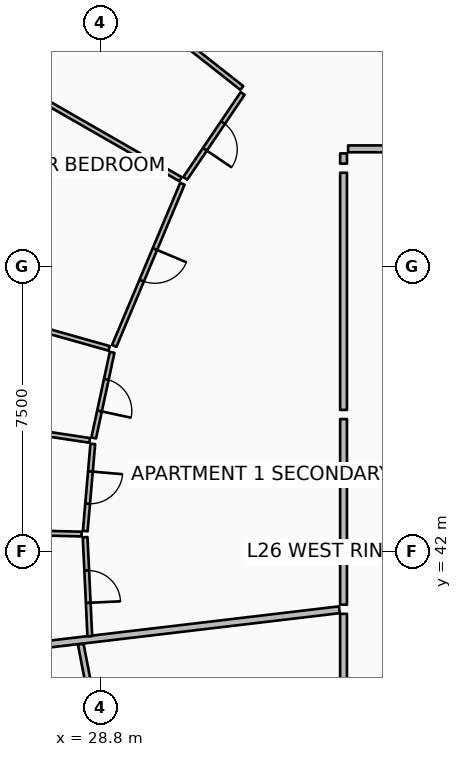
"""IFC4 building model, lengths in metres.
Left out: names, types, materials, properties, quantities, classifications, styles, units other than length and angle.
Written with IfcOpenShell. Run it as: python <this file> out.ifc"""

import sys

from ifc_helpers import new_model, si_unit, direction, frame, frame_2d, origin, place, context, subcontext, project, spatial, rectangle, extrude, element, fill, save


model = new_model("IFC4")
c1 = context("Model", 3, precision=1e-05, world=origin(), true_north=direction((0.0, 1.0)))
c2 = subcontext(c1, "Body", "Model", "MODEL_VIEW")
j1 = project(units=[si_unit("LENGTHUNIT", "METRE"), si_unit("PLANEANGLEUNIT", "RADIAN")], contexts=[c1])
p1 = place(None, origin())
s1 = spatial("IfcSite", under=j1, at=p1, CompositionType="ELEMENT")
p2 = place(p1, origin())
s2 = spatial("IfcBuilding", under=s1, at=p2, CompositionType="ELEMENT")
p3 = place(p2, frame((0.0, 0.0, 105.15)))
s3 = spatial("IfcBuildingStorey", under=s2, at=p3, CompositionType="ELEMENT", Elevation=105.15)
p4 = place(p3, frame((35.091, 40.472, 0.0), z_axis=(0.0, 0.0, 1.0), x_axis=(-0.99306845132, -0.117537445069, 0.0)))
e1 = element("IfcWall", 1, at=p4, inside=s3, PredefinedType="PARTITIONING", context=c2, shape_type="SweptSolid", body=[
    extrude(rectangle(XDim=16.48, YDim=0.18, at=frame_2d((8.24, 0.0))), origin(), (0.0, 0.0, 1.0), 2.94),
])
p5 = place(p3, frame((41.944, 52.6, 0.0), z_axis=(0.0, 0.0, 1.0), x_axis=(-1.0, 0.0, 0.0)))
e2 = element("IfcWall", 2, at=p5, inside=s3, PredefinedType="PARTITIONING", context=c2, shape_type="SweptSolid", body=[
    extrude(rectangle(XDim=6.624, YDim=0.18, at=frame_2d((3.312, 0.0))), origin(), (0.0, 0.0, 1.0), 2.94),
])
p6 = place(p5, frame((2.762, 0.0, 0.0)))
e3 = element("IfcOpeningElement", 3, at=p6, cuts=e2, PredefinedType="OPENING", context=c2, shape_type="SweptSolid", body=[
    extrude(rectangle(XDim=1.1, YDim=2.1, at=frame_2d((0.55, 1.05))), frame((0.0, 0.1, 0.0), z_axis=(0.0, -1.0, 0.0), x_axis=(1.0, 0.0, 0.0)), (0.0, 0.0, 1.0), 0.2),
])
p7 = place(p3, frame((35.2, 52.48, 0.0), z_axis=(0.0, 0.0, 1.0), x_axis=(0.0, -1.0, 0.0)))
e4 = element("IfcWall", 4, at=p7, inside=s3, PredefinedType="PARTITIONING", context=c2, shape_type="SweptSolid", body=[
    extrude(rectangle(XDim=0.269, YDim=0.18, at=frame_2d((0.135, 0.0))), origin(), (0.0, 0.0, 1.0), 2.94),
])
p8 = place(p3, frame((35.2, 51.971, 0.0), z_axis=(0.0, 0.0, 1.0), x_axis=(0.0, -1.0, 0.0)))
e5 = element("IfcWall", 5, at=p8, inside=s3, PredefinedType="PARTITIONING", context=c2, shape_type="SweptSolid", body=[
    extrude(rectangle(XDim=6.241, YDim=0.18, at=frame_2d((3.12, 0.0))), origin(), (0.0, 0.0, 1.0), 2.94),
])
p9 = place(p3, frame((32.522, 54.202, 0.0), z_axis=(0.0, 0.0, 1.0), x_axis=(-0.785296086335, 0.619120389574, 0.0)))
e6 = element("IfcWall", 6, at=p9, inside=s3, PredefinedType="PARTITIONING", context=c2, shape_type="SweptSolid", body=[
    extrude(rectangle(XDim=6.529, YDim=0.125, at=frame_2d((3.265, 0.0))), origin(), (0.0, 0.0, 1.0), 2.94),
])
p10 = place(p3, frame((30.912, 51.8, 0.0), z_axis=(0.0, 0.0, 1.0), x_axis=(-0.867452705788, 0.497519651091, 0.0)))
e7 = element("IfcWall", 7, at=p10, inside=s3, PredefinedType="PARTITIONING", context=c2, shape_type="SweptSolid", body=[
    extrude(rectangle(XDim=6.814, YDim=0.125, at=frame_2d((3.407, 0.0))), origin(), (0.0, 0.0, 1.0), 2.94),
])
p11 = place(p3, frame((32.545, 54.057, 0.0), z_axis=(0.0, 0.0, 1.0), x_axis=(-0.559849013212, -0.828594642998, 0.0)))
e8 = element("IfcWall", 8, at=p11, inside=s3, PredefinedType="PARTITIONING", context=c2, shape_type="SweptSolid", body=[
    extrude(rectangle(XDim=2.697, YDim=0.125, at=frame_2d((1.349, 0.0))), origin(), (0.0, 0.0, 1.0), 2.94),
])
p12 = place(p11, frame((0.924, 0.0, 0.0)))
e9 = element("IfcOpeningElement", 9, at=p12, cuts=e8, PredefinedType="OPENING", context=c2, shape_type="SweptSolid", body=[
    extrude(rectangle(XDim=0.85, YDim=2.06, at=frame_2d((0.425, 1.03))), frame((0.0, 0.073, 0.0), z_axis=(0.0, -1.0, 0.0), x_axis=(1.0, 0.0, 0.0)), (0.0, 0.0, 1.0), 0.145),
])
p13 = place(p3, frame((30.959, 51.682, 0.0), z_axis=(0.0, 0.0, 1.0), x_axis=(-0.387377754923, -0.921921078505, 0.0)))
e10 = element("IfcWall", 10, at=p13, inside=s3, PredefinedType="PARTITIONING", context=c2, shape_type="SweptSolid", body=[
    extrude(rectangle(XDim=4.628, YDim=0.125, at=frame_2d((2.314, 0.0))), origin(), (0.0, 0.0, 1.0), 2.94),
])
p14 = place(p13, frame((1.864, 0.0, 0.0)))
e11 = element("IfcOpeningElement", 11, at=p14, cuts=e10, PredefinedType="OPENING", context=c2, shape_type="SweptSolid", body=[
    extrude(rectangle(XDim=0.9, YDim=2.08, at=frame_2d((0.45, 1.04))), frame((0.0, 0.073, 0.0), z_axis=(0.0, -1.0, 0.0), x_axis=(1.0, 0.0, 0.0)), (0.0, 0.0, 1.0), 0.145),
])
p15 = place(p3, frame((35.2, 45.49, 0.0), z_axis=(0.0, 0.0, 1.0), x_axis=(0.0, -1.0, 0.0)))
e12 = element("IfcWall", 12, at=p15, inside=s3, PredefinedType="PARTITIONING", context=c2, shape_type="SweptSolid", body=[
    extrude(rectangle(XDim=4.885, YDim=0.18, at=frame_2d((2.442, 0.0))), origin(), (0.0, 0.0, 1.0), 2.94),
])
p16 = place(p3, frame((29.031, 47.35, 0.0), z_axis=(0.0, 0.0, 1.0), x_axis=(-0.962455027906, 0.271441189317, 0.0)))
e13 = element("IfcWall", 13, at=p16, inside=s3, PredefinedType="PARTITIONING", context=c2, shape_type="SweptSolid", body=[
    extrude(rectangle(XDim=8.862, YDim=0.125, at=frame_2d((4.431, 0.0))), origin(), (0.0, 0.0, 1.0), 2.94),
])
p17 = place(p3, frame((28.52, 44.929, 0.0), z_axis=(0.0, 0.0, 1.0), x_axis=(-0.988886383278, 0.148673201912, 0.0)))
e14 = element("IfcWall", 14, at=p17, inside=s3, PredefinedType="PARTITIONING", context=c2, shape_type="SweptSolid", body=[
    extrude(rectangle(XDim=8.969, YDim=0.125, at=frame_2d((4.485, 0.0))), origin(), (0.0, 0.0, 1.0), 2.94),
])
p18 = place(p3, frame((28.306, 42.464, 0.0), z_axis=(0.0, 0.0, 1.0), x_axis=(-0.999722179252, 0.023570411771, 0.0)))
e15 = element("IfcWall", 15, at=p18, inside=s3, PredefinedType="PARTITIONING", context=c2, shape_type="SweptSolid", body=[
    extrude(rectangle(XDim=9.426, YDim=0.125, at=frame_2d((4.713, 0.0))), origin(), (0.0, 0.0, 1.0), 2.94),
])
p19 = place(p3, frame((29.11, 47.244, 0.0), z_axis=(0.0, 0.0, 1.0), x_axis=(-0.210470334655, -0.977600244594, 0.0)))
e16 = element("IfcWall", 16, at=p19, inside=s3, PredefinedType="PARTITIONING", context=c2, shape_type="SweptSolid", body=[
    extrude(rectangle(XDim=2.302, YDim=0.125, at=frame_2d((1.151, 0.0))), origin(), (0.0, 0.0, 1.0), 2.94),
])
p20 = place(p19, frame((0.726, 0.0, 0.0)))
e17 = element("IfcOpeningElement", 17, at=p20, cuts=e16, PredefinedType="OPENING", context=c2, shape_type="SweptSolid", body=[
    extrude(rectangle(XDim=0.85, YDim=2.06, at=frame_2d((0.425, 1.03))), frame((0.0, 0.073, 0.0), z_axis=(0.0, -1.0, 0.0), x_axis=(1.0, 0.0, 0.0)), (0.0, 0.0, 1.0), 0.145),
])
p21 = place(p3, frame((28.602, 44.836, 0.0), z_axis=(0.0, 0.0, 1.0), x_axis=(-0.086309330274, -0.996268387287, 0.0)))
e18 = element("IfcWall", 18, at=p21, inside=s3, PredefinedType="PARTITIONING", context=c2, shape_type="SweptSolid", body=[
    extrude(rectangle(XDim=2.302, YDim=0.125, at=frame_2d((1.151, 0.0))), origin(), (0.0, 0.0, 1.0), 2.94),
])
p22 = place(p21, frame((0.726, 0.0, 0.0)))
e19 = element("IfcOpeningElement", 19, at=p22, cuts=e18, PredefinedType="OPENING", context=c2, shape_type="SweptSolid", body=[
    extrude(rectangle(XDim=0.85, YDim=2.06, at=frame_2d((0.425, 1.03))), frame((0.0, 0.073, 0.0), z_axis=(0.0, -1.0, 0.0), x_axis=(1.0, 0.0, 0.0)), (0.0, 0.0, 1.0), 0.145),
])
p23 = place(p3, frame((28.4, 42.382, 0.0), z_axis=(0.0, 0.0, 1.0), x_axis=(0.047147361322, -0.998887944827, 0.0)))
e20 = element("IfcWall", 20, at=p23, inside=s3, PredefinedType="PARTITIONING", context=c2, shape_type="SweptSolid", body=[
    extrude(rectangle(XDim=2.61, YDim=0.125, at=frame_2d((1.305, 0.0))), origin(), (0.0, 0.0, 1.0), 2.94),
])
p24 = place(p23, frame((0.88, 0.0, 0.0)))
e21 = element("IfcOpeningElement", 21, at=p24, cuts=e20, PredefinedType="OPENING", context=c2, shape_type="SweptSolid", body=[
    extrude(rectangle(XDim=0.85, YDim=2.06, at=frame_2d((0.425, 1.03))), frame((0.0, 0.073, 0.0), z_axis=(0.0, -1.0, 0.0), x_axis=(1.0, 0.0, 0.0)), (0.0, 0.0, 1.0), 0.145),
])
p25 = place(p3, frame((35.2, 40.365, 0.0), z_axis=(0.0, 0.0, 1.0), x_axis=(0.0, -1.0, 0.0)))
e22 = element("IfcWall", 22, at=p25, inside=s3, PredefinedType="PARTITIONING", context=c2, shape_type="SweptSolid", body=[
    extrude(rectangle(XDim=5.413, YDim=0.18, at=frame_2d((2.707, 0.0))), origin(), (0.0, 0.0, 1.0), 2.94),
])
p26 = place(p3, frame((28.285, 39.566, 0.0), z_axis=(0.0, 0.0, 1.0), x_axis=(0.189069796262, -0.98196365113, 0.0)))
e23 = element("IfcWall", 23, at=p26, inside=s3, PredefinedType="PARTITIONING", context=c2, shape_type="SweptSolid", body=[
    extrude(rectangle(XDim=2.687, YDim=0.15, at=frame_2d((1.344, 0.0))), origin(), (0.0, 0.0, 1.0), 2.94),
])
p27 = place(p26, frame((0.918, 0.0, 0.0)))
e24 = element("IfcOpeningElement", 24, at=p27, cuts=e23, PredefinedType="OPENING", context=c2, shape_type="SweptSolid", body=[
    extrude(rectangle(XDim=0.85, YDim=2.06, at=frame_2d((0.425, 1.03))), frame((0.0, 0.085, 0.0), z_axis=(0.0, -1.0, 0.0), x_axis=(1.0, 0.0, 0.0)), (0.0, 0.0, 1.0), 0.17),
])
p28 = place(p12, origin())
e25 = element("IfcDoor", 25, at=p28, inside=s3, OperationType="SINGLE_SWING_RIGHT", PredefinedType="DOOR", context=c2, shape_type="SweptSolid", body=[
    extrude(rectangle(XDim=0.85, YDim=2.06, at=frame_2d((0.425, 1.03))), frame((0.0, 0.025, 0.0), z_axis=(0.0, -1.0, 0.0), x_axis=(1.0, 0.0, 0.0)), (0.0, 0.0, 1.0), 0.05),
])
fill(e9, e25)
p29 = place(p14, origin())
e26 = element("IfcDoor", 26, at=p29, inside=s3, OperationType="SINGLE_SWING_LEFT", PredefinedType="DOOR", context=c2, shape_type="SweptSolid", body=[
    extrude(rectangle(XDim=0.9, YDim=2.08, at=frame_2d((0.45, 1.04))), frame((0.0, 0.025, 0.0), z_axis=(0.0, -1.0, 0.0), x_axis=(1.0, 0.0, 0.0)), (0.0, 0.0, 1.0), 0.05),
])
fill(e11, e26)
p30 = place(p20, origin())
e27 = element("IfcDoor", 27, at=p30, inside=s3, OperationType="SINGLE_SWING_RIGHT", PredefinedType="DOOR", context=c2, shape_type="SweptSolid", body=[
    extrude(rectangle(XDim=0.85, YDim=2.06, at=frame_2d((0.425, 1.03))), frame((0.0, 0.025, 0.0), z_axis=(0.0, -1.0, 0.0), x_axis=(1.0, 0.0, 0.0)), (0.0, 0.0, 1.0), 0.05),
])
fill(e17, e27)
p31 = place(p22, origin())
e28 = element("IfcDoor", 28, at=p31, inside=s3, OperationType="SINGLE_SWING_LEFT", PredefinedType="DOOR", context=c2, shape_type="SweptSolid", body=[
    extrude(rectangle(XDim=0.85, YDim=2.06, at=frame_2d((0.425, 1.03))), frame((0.0, 0.025, 0.0), z_axis=(0.0, -1.0, 0.0), x_axis=(1.0, 0.0, 0.0)), (0.0, 0.0, 1.0), 0.05),
])
fill(e19, e28)
p32 = place(p24, origin())
e29 = element("IfcDoor", 29, at=p32, inside=s3, OperationType="SINGLE_SWING_RIGHT", PredefinedType="DOOR", context=c2, shape_type="SweptSolid", body=[
    extrude(rectangle(XDim=0.85, YDim=2.06, at=frame_2d((0.425, 1.03))), frame((0.0, 0.025, 0.0), z_axis=(0.0, -1.0, 0.0), x_axis=(1.0, 0.0, 0.0)), (0.0, 0.0, 1.0), 0.05),
])
fill(e21, e29)
save(model, sys.argv[1])
